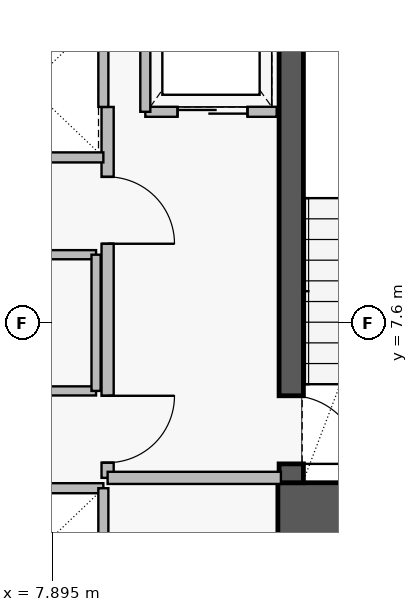
"""IFC4 building model, lengths in metres.
Left out: names, types, materials, properties, quantities, classifications, styles, units other than length and angle.
Written with IfcOpenShell. Run it as: python <this file> out.ifc"""

import sys

from ifc_helpers import new_model, si_unit, direction, frame, frame_2d, origin, place, context, subcontext, project, spatial, rectangle, extrude, element, fill, save


model = new_model("IFC4")
c1 = context("Model", 3, precision=1e-05, world=origin(), true_north=direction((0.0, 1.0)))
c2 = subcontext(c1, "Body", "Model", "MODEL_VIEW")
j1 = project(units=[si_unit("LENGTHUNIT", "METRE"), si_unit("PLANEANGLEUNIT", "RADIAN")], contexts=[c1])
p1 = place(None, origin())
s1 = spatial("IfcSite", under=j1, at=p1, CompositionType="ELEMENT")
p2 = place(p1, origin())
s2 = spatial("IfcBuilding", under=s1, at=p2, CompositionType="ELEMENT")
p3 = place(p2, frame((0.0, 0.0, 60.45)))
s3 = spatial("IfcBuildingStorey", under=s2, at=p3, CompositionType="ELEMENT", Elevation=60.45)
p4 = place(p3, frame((11.6, 4.52, 0.0), z_axis=(0.0, 0.0, 1.0), x_axis=(1.0, 0.0, 0.0)))
e1 = element("IfcWall", 1, at=p4, inside=s3, PredefinedType="SHEAR", context=c2, shape_type="SweptSolid", body=[
    extrude(rectangle(XDim=4.71, YDim=0.9, at=frame_2d((2.355, 0.0))), origin(), (0.0, 0.0, 1.0), 3.46),
])
p5 = place(p3, frame((11.82, 13.93, 0.0), z_axis=(0.0, 0.0, 1.0), x_axis=(0.0, -1.0, 0.0)))
e2 = element("IfcWall", 2, at=p5, inside=s3, PredefinedType="SHEAR", context=c2, shape_type="SweptSolid", body=[
    extrude(rectangle(XDim=8.96, YDim=0.4, at=frame_2d((4.48, 0.0))), origin(), (0.0, 0.0, 1.0), 3.46),
])
p6 = place(p5, frame((7.53, 0.0, 0.0)))
e3 = element("IfcOpeningElement", 3, at=p6, cuts=e2, PredefinedType="OPENING", context=c2, shape_type="SweptSolid", body=[
    extrude(rectangle(XDim=1.12, YDim=2.22, at=frame_2d((0.56, 1.11))), frame((0.0, 0.21, 0.0), z_axis=(0.0, -1.0, 0.0), x_axis=(1.0, 0.0, 0.0)), (0.0, 0.0, 1.0), 0.42),
])
p7 = place(p3, frame((8.8, 11.15, 0.0), z_axis=(0.0, 0.0, 1.0), x_axis=(0.0, -1.0, 0.0)))
e4 = element("IfcWall", 4, at=p7, inside=s3, PredefinedType="PARTITIONING", context=c2, shape_type="SweptSolid", body=[
    extrude(rectangle(XDim=6.1, YDim=0.2, at=frame_2d((3.05, 0.0))), origin(), (0.0, 0.0, 1.0), 3.43),
])
p8 = place(p7, frame((1.15, 0.0, 0.0)))
e5 = element("IfcOpeningElement", 5, at=p8, cuts=e4, PredefinedType="OPENING", context=c2, shape_type="SweptSolid", body=[
    extrude(rectangle(XDim=1.1, YDim=2.2, at=frame_2d((0.55, 1.1))), frame((0.0, 0.11, 0.0), z_axis=(0.0, -1.0, 0.0), x_axis=(1.0, 0.0, 0.0)), (0.0, 0.0, 1.0), 0.22),
])
p9 = place(p7, frame((4.75, 0.0, 0.0)))
e6 = element("IfcOpeningElement", 6, at=p9, cuts=e4, PredefinedType="OPENING", context=c2, shape_type="SweptSolid", body=[
    extrude(rectangle(XDim=1.1, YDim=2.2, at=frame_2d((0.55, 1.1))), frame((0.0, 0.11, 0.0), z_axis=(0.0, -1.0, 0.0), x_axis=(1.0, 0.0, 0.0)), (0.0, 0.0, 1.0), 0.22),
])
p10 = place(p3, frame((9.42, 11.07, 0.0), z_axis=(0.0, 0.0, 1.0), x_axis=(1.0, 0.0, 0.0)))
e7 = element("IfcWall", 7, at=p10, inside=s3, PredefinedType="PARTITIONING", context=c2, shape_type="SweptSolid", body=[
    extrude(rectangle(XDim=2.16, YDim=0.165, at=frame_2d((1.08, 0.0))), origin(), (0.0, 0.0, 1.0), 3.43),
])
p11 = place(p10, frame((0.53, 0.0, 0.0)))
e8 = element("IfcOpeningElement", 8, at=p11, cuts=e7, PredefinedType="OPENING", context=c2, shape_type="SweptSolid", body=[
    extrude(rectangle(XDim=1.15, YDim=2.25, at=frame_2d((0.575, 1.125))), frame((0.0, 0.093, 0.0), z_axis=(0.0, -1.0, 0.0), x_axis=(1.0, 0.0, 0.0)), (0.0, 0.0, 1.0), 0.185),
])
p12 = place(p3, frame((4.37, 6.48, 0.0), z_axis=(0.0, 0.0, 1.0), x_axis=(1.0, 0.0, 0.0)))
e9 = element("IfcWall", 9, at=p12, inside=s3, PredefinedType="PARTITIONING", context=c2, shape_type="SweptSolid", body=[
    extrude(rectangle(XDim=4.24, YDim=0.15, at=frame_2d((2.12, 0.0))), origin(), (0.0, 0.0, 1.0), 3.43),
])
p13 = place(p12, frame((1.67, 0.0, 0.0)))
e10 = element("IfcOpeningElement", 10, at=p13, cuts=e9, PredefinedType="OPENING", context=c2, shape_type="SweptSolid", body=[
    extrude(rectangle(XDim=0.9, YDim=2.15, at=frame_2d((0.45, 1.075))), frame((0.0, 0.085, 0.0), z_axis=(0.0, -1.0, 0.0), x_axis=(1.0, 0.0, 0.0)), (0.0, 0.0, 1.0), 0.17),
])
p14 = place(p3, frame((8.8, 5.05, 0.0), z_axis=(0.0, 0.0, 1.0), x_axis=(1.0, 0.0, 0.0)))
e11 = element("IfcWall", 11, at=p14, inside=s3, PredefinedType="PARTITIONING", context=c2, shape_type="SweptSolid", body=[
    extrude(rectangle(XDim=2.85, YDim=0.2, at=frame_2d((1.425, 0.0))), origin(), (0.0, 0.0, 1.0), 3.43),
])
p15 = place(p3, frame((9.42, 11.07, 0.0), z_axis=(0.0, 0.0, 1.0), x_axis=(0.0, 1.0, 0.0)))
e12 = element("IfcWall", 12, at=p15, inside=s3, PredefinedType="PARTITIONING", context=c2, shape_type="SweptSolid", body=[
    extrude(rectangle(XDim=2.96, YDim=0.165, at=frame_2d((1.48, 0.0))), origin(), (0.0, 0.0, 1.0), 3.43),
])
p16 = place(p3, frame((6.25, 4.88, 0.0), z_axis=(0.0, 0.0, 1.0), x_axis=(1.0, 0.0, 0.0)))
e13 = element("IfcWall", 13, at=p16, inside=s3, PredefinedType="PARTITIONING", context=c2, shape_type="SweptSolid", body=[
    extrude(rectangle(XDim=2.48, YDim=0.165, at=frame_2d((1.24, 0.0))), origin(), (0.0, 0.0, 1.0), 3.43),
])
p17 = place(p3, frame((8.73, 2.52, 0.0), z_axis=(0.0, 0.0, 1.0), x_axis=(0.0, 1.0, 0.0)))
e14 = element("IfcWall", 14, at=p17, inside=s3, PredefinedType="PARTITIONING", context=c2, shape_type="SweptSolid", body=[
    extrude(rectangle(XDim=2.36, YDim=0.165, at=frame_2d((1.18, 0.0))), origin(), (0.0, 0.0, 1.0), 3.43),
])
p18 = place(p3, frame((6.25, 10.32, 0.0), z_axis=(0.0, 0.0, 1.0), x_axis=(1.0, 0.0, 0.0)))
e15 = element("IfcWall", 15, at=p18, inside=s3, PredefinedType="PARTITIONING", context=c2, shape_type="SweptSolid", body=[
    extrude(rectangle(XDim=2.48, YDim=0.165, at=frame_2d((1.24, 0.0))), origin(), (0.0, 0.0, 1.0), 3.43),
])
p19 = place(p3, frame((8.73, 11.15, 0.0), z_axis=(0.0, 0.0, 1.0), x_axis=(0.0, 1.0, 0.0)))
e16 = element("IfcWall", 16, at=p19, inside=s3, PredefinedType="PARTITIONING", context=c2, shape_type="SweptSolid", body=[
    extrude(rectangle(XDim=1.53, YDim=0.165, at=frame_2d((0.765, 0.0))), origin(), (0.0, 0.0, 1.0), 3.43),
])
p20 = place(p3, frame((4.37, 8.72, 0.0), z_axis=(0.0, 0.0, 1.0), x_axis=(1.0, 0.0, 0.0)))
e17 = element("IfcWall", 17, at=p20, inside=s3, PredefinedType="PARTITIONING", context=c2, shape_type="SweptSolid", body=[
    extrude(rectangle(XDim=4.24, YDim=0.15, at=frame_2d((2.12, 0.0))), origin(), (0.0, 0.0, 1.0), 3.43),
])
p21 = place(p3, frame((8.61, 6.48, 0.0), z_axis=(0.0, 0.0, 1.0), x_axis=(0.0, 1.0, 0.0)))
e18 = element("IfcWall", 18, at=p21, inside=s3, PredefinedType="PARTITIONING", context=c2, shape_type="SweptSolid", body=[
    extrude(rectangle(XDim=2.24, YDim=0.15, at=frame_2d((1.12, 0.0))), origin(), (0.0, 0.0, 1.0), 3.43),
])
p22 = place(p6, origin())
e19 = element("IfcDoor", 19, at=p22, inside=s3, OperationType="SINGLE_SWING_RIGHT", PredefinedType="DOOR", context=c2, shape_type="SweptSolid", body=[
    extrude(rectangle(XDim=1.12, YDim=2.22, at=frame_2d((0.56, 1.11))), frame((0.0, 0.025, 0.0), z_axis=(0.0, -1.0, 0.0), x_axis=(1.0, 0.0, 0.0)), (0.0, 0.0, 1.0), 0.05),
])
fill(e3, e19)
p23 = place(p8, origin())
e20 = element("IfcDoor", 20, at=p23, inside=s3, OperationType="SINGLE_SWING_RIGHT", PredefinedType="DOOR", context=c2, shape_type="SweptSolid", body=[
    extrude(rectangle(XDim=1.1, YDim=2.2, at=frame_2d((0.55, 1.1))), frame((0.0, 0.025, 0.0), z_axis=(0.0, -1.0, 0.0), x_axis=(1.0, 0.0, 0.0)), (0.0, 0.0, 1.0), 0.05),
])
fill(e5, e20)
p24 = place(p9, origin())
e21 = element("IfcDoor", 21, at=p24, inside=s3, OperationType="SINGLE_SWING_LEFT", PredefinedType="DOOR", context=c2, shape_type="SweptSolid", body=[
    extrude(rectangle(XDim=1.1, YDim=2.2, at=frame_2d((0.55, 1.1))), frame((0.0, 0.025, 0.0), z_axis=(0.0, -1.0, 0.0), x_axis=(1.0, 0.0, 0.0)), (0.0, 0.0, 1.0), 0.05),
])
fill(e6, e21)
p25 = place(p11, origin())
e22 = element("IfcDoor", 22, at=p25, inside=s3, OperationType="SLIDING_TO_LEFT", PredefinedType="DOOR", context=c2, shape_type="SweptSolid", body=[
    extrude(rectangle(XDim=1.15, YDim=2.25, at=frame_2d((0.575, 1.125))), frame((0.0, 0.025, 0.0), z_axis=(0.0, -1.0, 0.0), x_axis=(1.0, 0.0, 0.0)), (0.0, 0.0, 1.0), 0.05),
])
fill(e8, e22)
save(model, sys.argv[1])
